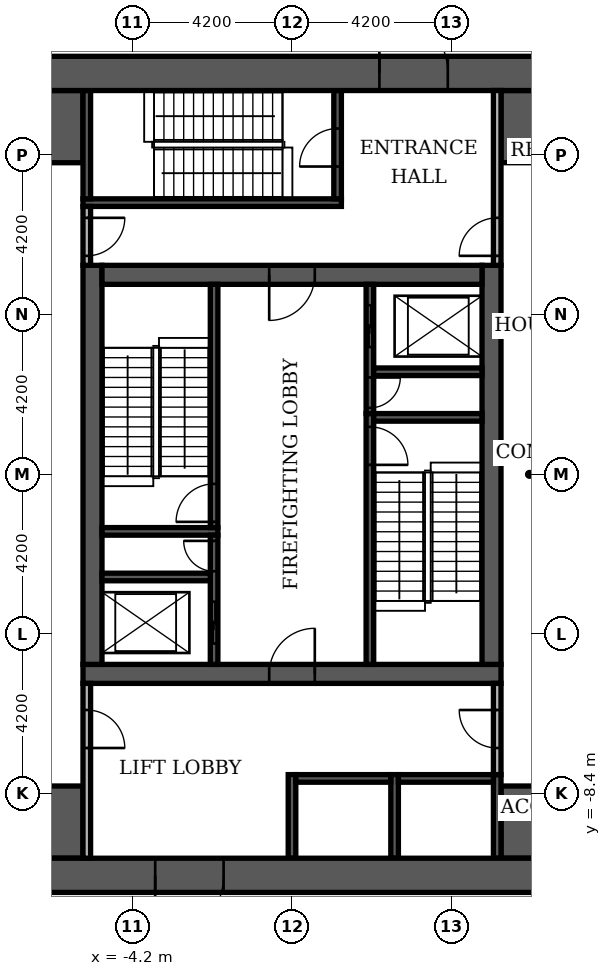
"""IFC4 building model, lengths in metres.
Left out: names, types, materials, properties, quantities, classifications, styles, units other than length and angle.
Written with IfcOpenShell. Run it as: python <this file> out.ifc"""

import sys

from ifc_helpers import new_model, si_unit, direction, frame, frame_2d, origin, place, context, subcontext, project, spatial, rectangle, extrude, element, fill, save


model = new_model("IFC4")
c1 = context("Model", 3, precision=1e-05, world=origin(), true_north=direction((0.0, 1.0)))
c2 = subcontext(c1, "Body", "Model", "MODEL_VIEW")
j1 = project(units=[si_unit("LENGTHUNIT", "METRE"), si_unit("PLANEANGLEUNIT", "RADIAN")], contexts=[c1])
p1 = place(None, origin())
s1 = spatial("IfcSite", under=j1, at=p1, CompositionType="ELEMENT")
p2 = place(p1, origin())
s2 = spatial("IfcBuilding", under=s1, at=p2, CompositionType="ELEMENT")
p3 = place(p2, frame((0.0, 0.0, 22.2)))
s3 = spatial("IfcBuildingStorey", under=s2, at=p3, CompositionType="ELEMENT", Elevation=22.2)
p4 = place(p3, frame((-5.5, -5.25, 0.0), z_axis=(0.0, 0.0, 1.0), x_axis=(1.0, 0.0, 0.0)))
e1 = element("IfcWall", 1, at=p4, inside=s3, PredefinedType="SHEAR", context=c2, shape_type="SweptSolid", body=[
    extrude(rectangle(XDim=11.0, YDim=0.5, at=frame_2d((5.5, 0.0))), origin(), (0.0, 0.0, 1.0), 4.3),
])
p5 = place(p4, frame((4.9, 0.0, 0.0)))
e2 = element("IfcOpeningElement", 2, at=p5, cuts=e1, PredefinedType="OPENING", context=c2, shape_type="SweptSolid", body=[
    extrude(rectangle(XDim=1.2, YDim=2.1, at=frame_2d((0.6, 1.05))), frame((0.0, 0.26, 0.0), z_axis=(0.0, -1.0, 0.0), x_axis=(1.0, 0.0, 0.0)), (0.0, 0.0, 1.0), 0.52),
])
for number, where, z_axis, x_axis in (
    (3, (-5.25, -5.0, 0.0), (0.0, 0.0, 1.0), (0.0, 1.0, 0.0)),
    (4, (5.25, -5.0, 0.0), (0.0, 0.0, 1.0), (0.0, 1.0, 0.0)),
):
    element("IfcWall", number, at=place(p3, frame(where, z_axis=z_axis, x_axis=x_axis)), inside=s3, PredefinedType="SHEAR", context=c2, shape_type="SweptSolid", body=[
        extrude(rectangle(XDim=10.5, YDim=0.5, at=frame_2d((5.25, 0.0))), origin(), (0.0, 0.0, 1.0), 4.3),
    ])
p6 = place(p3, frame((-5.0, 5.25, 0.0), z_axis=(0.0, 0.0, 1.0), x_axis=(1.0, 0.0, 0.0)))
e5 = element("IfcWall", 5, at=p6, inside=s3, PredefinedType="SHEAR", context=c2, shape_type="SweptSolid", body=[
    extrude(rectangle(XDim=10.0, YDim=0.5, at=frame_2d((5.0, 0.0))), origin(), (0.0, 0.0, 1.0), 4.3),
])
p7 = place(p6, frame((4.4, 0.0, 0.0)))
e6 = element("IfcOpeningElement", 6, at=p7, cuts=e5, PredefinedType="OPENING", context=c2, shape_type="SweptSolid", body=[
    extrude(rectangle(XDim=1.2, YDim=2.1, at=frame_2d((0.6, 1.05))), frame((0.0, 0.26, 0.0), z_axis=(0.0, -1.0, 0.0), x_axis=(1.0, 0.0, 0.0)), (0.0, 0.0, 1.0), 0.52),
])
for number, where, z_axis, x_axis in (
    (7, (-10.1, -9.15, 0.0), (0.0, 0.0, 1.0), (1.0, 0.0, 0.0)),
    (8, (5.5, -9.15, 0.0), (0.0, 0.0, 1.0), (1.0, 0.0, 0.0)),
    (9, (-10.1, 9.15, 0.0), (0.0, 0.0, 1.0), (1.0, 0.0, 0.0)),
    (10, (5.5, 9.15, 0.0), (0.0, 0.0, 1.0), (1.0, 0.0, 0.0)),
):
    element("IfcWall", number, at=place(p3, frame(where, z_axis=z_axis, x_axis=x_axis)), inside=s3, PredefinedType="SHEAR", context=c2, shape_type="SweptSolid", body=[
        extrude(rectangle(XDim=4.6, YDim=1.9, at=frame_2d((2.3, 0.0))), origin(), (0.0, 0.0, 1.0), 4.3),
    ])
p8 = place(p3, frame((2.05, -5.0, 0.0), z_axis=(0.0, 0.0, 1.0), x_axis=(0.0, 1.0, 0.0)))
e11 = element("IfcWall", 11, at=p8, inside=s3, PredefinedType="SHEAR", context=c2, shape_type="SweptSolid", body=[
    extrude(rectangle(XDim=6.6, YDim=0.2, at=frame_2d((3.3, 0.0))), origin(), (0.0, 0.0, 1.0), 4.3),
])
p9 = place(p8, frame((5.25, 0.0, 0.0)))
e12 = element("IfcOpeningElement", 12, at=p9, cuts=e11, PredefinedType="OPENING", context=c2, shape_type="SweptSolid", body=[
    extrude(rectangle(XDim=1.0, YDim=2.1, at=frame_2d((0.5, 1.05))), frame((0.0, 0.11, 0.0), z_axis=(0.0, -1.0, 0.0), x_axis=(1.0, 0.0, 0.0)), (0.0, 0.0, 1.0), 0.22),
])
p10 = place(p3, frame((-5.0, -1.5, 0.0), z_axis=(0.0, 0.0, 1.0), x_axis=(1.0, 0.0, 0.0)))
e13 = element("IfcWall", 13, at=p10, inside=s3, PredefinedType="SHEAR", context=c2, shape_type="SweptSolid", body=[
    extrude(rectangle(XDim=3.05, YDim=0.2, at=frame_2d((1.525, 0.0))), origin(), (0.0, 0.0, 1.0), 4.3),
])
p11 = place(p3, frame((-2.05, -1.4, 0.0), z_axis=(0.0, 0.0, 1.0), x_axis=(0.0, 1.0, 0.0)))
e14 = element("IfcWall", 14, at=p11, inside=s3, PredefinedType="SHEAR", context=c2, shape_type="SweptSolid", body=[
    extrude(rectangle(XDim=6.4, YDim=0.2, at=frame_2d((3.2, 0.0))), origin(), (0.0, 0.0, 1.0), 4.3),
])
p12 = place(p11, frame((0.15, 0.0, 0.0)))
e15 = element("IfcOpeningElement", 15, at=p12, cuts=e14, PredefinedType="OPENING", context=c2, shape_type="SweptSolid", body=[
    extrude(rectangle(XDim=1.0, YDim=2.1, at=frame_2d((0.5, 1.05))), frame((0.0, 0.11, 0.0), z_axis=(0.0, -1.0, 0.0), x_axis=(1.0, 0.0, 0.0)), (0.0, 0.0, 1.0), 0.22),
])
p13 = place(p3, frame((2.15, 1.5, 0.0), z_axis=(0.0, 0.0, 1.0), x_axis=(1.0, 0.0, 0.0)))
e16 = element("IfcWall", 16, at=p13, inside=s3, PredefinedType="SHEAR", context=c2, shape_type="SweptSolid", body=[
    extrude(rectangle(XDim=2.85, YDim=0.2, at=frame_2d((1.425, 0.0))), origin(), (0.0, 0.0, 1.0), 4.3),
])
p14 = place(p3, frame((-5.5, 7.15, 0.0), z_axis=(0.0, 0.0, 1.0), x_axis=(1.0, 0.0, 0.0)))
e17 = element("IfcWall", 17, at=p14, inside=s3, PredefinedType="SHEAR", context=c2, shape_type="SweptSolid", body=[
    extrude(rectangle(XDim=6.8, YDim=0.2, at=frame_2d((3.4, 0.0))), origin(), (0.0, 0.0, 1.0), 4.3),
])
p15 = place(p3, frame((-5.4, 7.25, 0.0), z_axis=(0.0, 0.0, 1.0), x_axis=(0.0, 1.0, 0.0)))
e18 = element("IfcWall", 18, at=p15, inside=s3, PredefinedType="SHEAR", context=c2, shape_type="SweptSolid", body=[
    extrude(rectangle(XDim=2.85, YDim=0.2, at=frame_2d((1.425, 0.0))), origin(), (0.0, 0.0, 1.0), 4.3),
])
p16 = place(p3, frame((1.2, 7.25, 0.0), z_axis=(0.0, 0.0, 1.0), x_axis=(0.0, 1.0, 0.0)))
e19 = element("IfcWall", 19, at=p16, inside=s3, PredefinedType="SHEAR", context=c2, shape_type="SweptSolid", body=[
    extrude(rectangle(XDim=2.85, YDim=0.2, at=frame_2d((1.425, 0.0))), origin(), (0.0, 0.0, 1.0), 4.3),
])
p17 = place(p16, frame((0.85, 0.0, 0.0)))
e20 = element("IfcOpeningElement", 20, at=p17, cuts=e19, PredefinedType="OPENING", context=c2, shape_type="SweptSolid", body=[
    extrude(rectangle(XDim=1.0, YDim=2.1, at=frame_2d((0.5, 1.05))), frame((0.0, 0.11, 0.0), z_axis=(0.0, -1.0, 0.0), x_axis=(1.0, 0.0, 0.0)), (0.0, 0.0, 1.0), 0.22),
])
for number, where, z_axis, x_axis in (
    (21, (0.0, -10.1, 0.0), (0.0, 0.0, 1.0), (0.0, 1.0, 0.0)),
    (22, (2.7, -10.1, 0.0), (0.0, 0.0, 1.0), (0.0, 1.0, 0.0)),
    (23, (5.4, -10.1, 0.0), (0.0, 0.0, 1.0), (0.0, 1.0, 0.0)),
):
    element("IfcWall", number, at=place(p3, frame(where, z_axis=z_axis, x_axis=x_axis)), inside=s3, PredefinedType="SHEAR", context=c2, shape_type="SweptSolid", body=[
        extrude(rectangle(XDim=2.2, YDim=0.2, at=frame_2d((1.1, 0.0))), origin(), (0.0, 0.0, 1.0), 4.3),
    ])
for number, where, z_axis, x_axis in (
    (24, (0.1, -8.0, 0.0), (0.0, 0.0, 1.0), (1.0, 0.0, 0.0)),
    (25, (2.8, -8.0, 0.0), (0.0, 0.0, 1.0), (1.0, 0.0, 0.0)),
):
    element("IfcWall", number, at=place(p3, frame(where, z_axis=z_axis, x_axis=x_axis)), inside=s3, PredefinedType="SHEAR", context=c2, shape_type="SweptSolid", body=[
        extrude(rectangle(XDim=2.5, YDim=0.2, at=frame_2d((1.25, 0.0))), origin(), (0.0, 0.0, 1.0), 4.3),
    ])
p18 = place(p3, frame((-2.05, -5.0, 0.0), z_axis=(0.0, 0.0, 1.0), x_axis=(0.0, 1.0, 0.0)))
e26 = element("IfcWall", 26, at=p18, inside=s3, PredefinedType="SHEAR", context=c2, shape_type="SweptSolid", body=[
    extrude(rectangle(XDim=3.4, YDim=0.2, at=frame_2d((1.7, 0.0))), origin(), (0.0, 0.0, 1.0), 4.3),
])
p19 = place(p18, frame((0.55, 0.0, 0.0)))
e27 = element("IfcOpeningElement", 27, at=p19, cuts=e26, PredefinedType="OPENING", context=c2, shape_type="SweptSolid", body=[
    extrude(rectangle(XDim=1.1, YDim=2.1, at=frame_2d((0.55, 1.05))), frame((0.0, 0.11, 0.0), z_axis=(0.0, -1.0, 0.0), x_axis=(1.0, 0.0, 0.0)), (0.0, 0.0, 1.0), 0.22),
])
p20 = place(p18, frame((2.45, 0.0, 0.0)))
e28 = element("IfcOpeningElement", 28, at=p20, cuts=e26, PredefinedType="OPENING", context=c2, shape_type="SweptSolid", body=[
    extrude(rectangle(XDim=0.8, YDim=2.1, at=frame_2d((0.4, 1.05))), frame((0.0, 0.11, 0.0), z_axis=(0.0, -1.0, 0.0), x_axis=(1.0, 0.0, 0.0)), (0.0, 0.0, 1.0), 0.22),
])
p21 = place(p3, frame((-5.0, -2.7, 0.0), z_axis=(0.0, 0.0, 1.0), x_axis=(1.0, 0.0, 0.0)))
e29 = element("IfcWall", 29, at=p21, inside=s3, PredefinedType="SHEAR", context=c2, shape_type="SweptSolid", body=[
    extrude(rectangle(XDim=2.85, YDim=0.2, at=frame_2d((1.425, 0.0))), origin(), (0.0, 0.0, 1.0), 4.3),
])
p22 = place(p3, frame((2.05, 1.6, 0.0), z_axis=(0.0, 0.0, 1.0), x_axis=(0.0, 1.0, 0.0)))
e30 = element("IfcWall", 30, at=p22, inside=s3, PredefinedType="SHEAR", context=c2, shape_type="SweptSolid", body=[
    extrude(rectangle(XDim=3.4, YDim=0.2, at=frame_2d((1.7, 0.0))), origin(), (0.0, 0.0, 1.0), 4.3),
])
p23 = place(p22, frame((1.75, 0.0, 0.0)))
e31 = element("IfcOpeningElement", 31, at=p23, cuts=e30, PredefinedType="OPENING", context=c2, shape_type="SweptSolid", body=[
    extrude(rectangle(XDim=1.1, YDim=2.1, at=frame_2d((0.55, 1.05))), frame((0.0, 0.11, 0.0), z_axis=(0.0, -1.0, 0.0), x_axis=(1.0, 0.0, 0.0)), (0.0, 0.0, 1.0), 0.22),
])
p24 = place(p22, frame((0.15, 0.0, 0.0)))
e32 = element("IfcOpeningElement", 32, at=p24, cuts=e30, PredefinedType="OPENING", context=c2, shape_type="SweptSolid", body=[
    extrude(rectangle(XDim=0.8, YDim=2.1, at=frame_2d((0.4, 1.05))), frame((0.0, 0.11, 0.0), z_axis=(0.0, -1.0, 0.0), x_axis=(1.0, 0.0, 0.0)), (0.0, 0.0, 1.0), 0.22),
])
p25 = place(p3, frame((2.15, 2.7, 0.0), z_axis=(0.0, 0.0, 1.0), x_axis=(1.0, 0.0, 0.0)))
e33 = element("IfcWall", 33, at=p25, inside=s3, PredefinedType="SHEAR", context=c2, shape_type="SweptSolid", body=[
    extrude(rectangle(XDim=2.85, YDim=0.2, at=frame_2d((1.425, 0.0))), origin(), (0.0, 0.0, 1.0), 4.3),
])
p26 = place(p3, frame((-11.0, -10.55, 0.0), z_axis=(0.0, 0.0, 1.0), x_axis=(1.0, 0.0, 0.0)))
e34 = element("IfcWall", 34, at=p26, inside=s3, PredefinedType="SHEAR", context=c2, shape_type="SweptSolid", body=[
    extrude(rectangle(XDim=22.0, YDim=0.9, at=frame_2d((11.0, 0.0))), origin(), (0.0, 0.0, 1.0), 4.3),
])
p27 = place(p26, frame((7.4, 0.0, 0.0)))
e35 = element("IfcOpeningElement", 35, at=p27, cuts=e34, PredefinedType="OPENING", context=c2, shape_type="SweptSolid", body=[
    extrude(rectangle(XDim=1.8, YDim=2.2, at=frame_2d((0.9, 1.1))), frame((0.0, 0.46, 0.0), z_axis=(0.0, -1.0, 0.0), x_axis=(1.0, 0.0, 0.0)), (0.0, 0.0, 1.0), 0.92),
])
p28 = place(p3, frame((-11.0, 10.55, 0.0), z_axis=(0.0, 0.0, 1.0), x_axis=(1.0, 0.0, 0.0)))
e36 = element("IfcWall", 36, at=p28, inside=s3, PredefinedType="SHEAR", context=c2, shape_type="SweptSolid", body=[
    extrude(rectangle(XDim=22.0, YDim=0.9, at=frame_2d((11.0, 0.0))), origin(), (0.0, 0.0, 1.0), 4.3),
])
p29 = place(p28, frame((13.3, 0.0, 0.0)))
e37 = element("IfcOpeningElement", 37, at=p29, cuts=e36, PredefinedType="OPENING", context=c2, shape_type="SweptSolid", body=[
    extrude(rectangle(XDim=1.8, YDim=2.2, at=frame_2d((0.9, 1.1))), frame((0.0, 0.46, 0.0), z_axis=(0.0, -1.0, 0.0), x_axis=(1.0, 0.0, 0.0)), (0.0, 0.0, 1.0), 0.92),
])
p30 = place(p3, frame((-5.4, -10.1, 0.0), z_axis=(0.0, 0.0, 1.0), x_axis=(0.0, 1.0, 0.0)))
e38 = element("IfcWall", 38, at=p30, inside=s3, PredefinedType="PARTITIONING", context=c2, shape_type="SweptSolid", body=[
    extrude(rectangle(XDim=4.6, YDim=0.2, at=frame_2d((2.3, 0.0))), origin(), (0.0, 0.0, 1.0), 4.3),
])
p31 = place(p30, frame((2.9, 0.0, 0.0)))
e39 = element("IfcOpeningElement", 39, at=p31, cuts=e38, PredefinedType="OPENING", context=c2, shape_type="SweptSolid", body=[
    extrude(rectangle(XDim=1.0, YDim=2.1, at=frame_2d((0.5, 1.05))), frame((0.0, 0.11, 0.0), z_axis=(0.0, -1.0, 0.0), x_axis=(1.0, 0.0, 0.0)), (0.0, 0.0, 1.0), 0.22),
])
p32 = place(p3, frame((5.4, -7.9, 0.0), z_axis=(0.0, 0.0, 1.0), x_axis=(0.0, 1.0, 0.0)))
e40 = element("IfcWall", 40, at=p32, inside=s3, PredefinedType="PARTITIONING", context=c2, shape_type="SweptSolid", body=[
    extrude(rectangle(XDim=2.4, YDim=0.2, at=frame_2d((1.2, 0.0))), origin(), (0.0, 0.0, 1.0), 4.3),
])
p33 = place(p32, frame((0.7, 0.0, 0.0)))
e41 = element("IfcOpeningElement", 41, at=p33, cuts=e40, PredefinedType="OPENING", context=c2, shape_type="SweptSolid", body=[
    extrude(rectangle(XDim=1.0, YDim=2.1, at=frame_2d((0.5, 1.05))), frame((0.0, 0.11, 0.0), z_axis=(0.0, -1.0, 0.0), x_axis=(1.0, 0.0, 0.0)), (0.0, 0.0, 1.0), 0.22),
])
p34 = place(p3, frame((-5.4, 5.5, 0.0), z_axis=(0.0, 0.0, 1.0), x_axis=(0.0, 1.0, 0.0)))
e42 = element("IfcWall", 42, at=p34, inside=s3, PredefinedType="PARTITIONING", context=c2, shape_type="SweptSolid", body=[
    extrude(rectangle(XDim=1.55, YDim=0.2, at=frame_2d((0.775, 0.0))), origin(), (0.0, 0.0, 1.0), 4.3),
])
p35 = place(p34, frame((0.25, 0.0, 0.0)))
e43 = element("IfcOpeningElement", 43, at=p35, cuts=e42, PredefinedType="OPENING", context=c2, shape_type="SweptSolid", body=[
    extrude(rectangle(XDim=1.0, YDim=2.1, at=frame_2d((0.5, 1.05))), frame((0.0, 0.11, 0.0), z_axis=(0.0, -1.0, 0.0), x_axis=(1.0, 0.0, 0.0)), (0.0, 0.0, 1.0), 0.22),
])
p36 = place(p3, frame((5.4, 5.5, 0.0), z_axis=(0.0, 0.0, 1.0), x_axis=(0.0, 1.0, 0.0)))
e44 = element("IfcWall", 44, at=p36, inside=s3, PredefinedType="PARTITIONING", context=c2, shape_type="SweptSolid", body=[
    extrude(rectangle(XDim=4.6, YDim=0.2, at=frame_2d((2.3, 0.0))), origin(), (0.0, 0.0, 1.0), 4.3),
])
p37 = place(p36, frame((0.25, 0.0, 0.0)))
e45 = element("IfcOpeningElement", 45, at=p37, cuts=e44, PredefinedType="OPENING", context=c2, shape_type="SweptSolid", body=[
    extrude(rectangle(XDim=1.0, YDim=2.1, at=frame_2d((0.5, 1.05))), frame((0.0, 0.11, 0.0), z_axis=(0.0, -1.0, 0.0), x_axis=(1.0, 0.0, 0.0)), (0.0, 0.0, 1.0), 0.22),
])
p38 = place(p23, origin())
e46 = element("IfcDoor", 46, at=p38, inside=s3, OperationType="SLIDING_TO_LEFT", PredefinedType="DOOR", context=c2, shape_type="SweptSolid", body=[
    extrude(rectangle(XDim=1.1, YDim=2.1, at=frame_2d((0.55, 1.05))), frame((0.0, 0.025, 0.0), z_axis=(0.0, -1.0, 0.0), x_axis=(1.0, 0.0, 0.0)), (0.0, 0.0, 1.0), 0.05),
])
fill(e31, e46)
p39 = place(p19, origin())
e47 = element("IfcDoor", 47, at=p39, inside=s3, OperationType="SLIDING_TO_LEFT", PredefinedType="DOOR", context=c2, shape_type="SweptSolid", body=[
    extrude(rectangle(XDim=1.1, YDim=2.1, at=frame_2d((0.55, 1.05))), frame((0.0, 0.025, 0.0), z_axis=(0.0, -1.0, 0.0), x_axis=(1.0, 0.0, 0.0)), (0.0, 0.0, 1.0), 0.05),
])
fill(e27, e47)
p40 = place(p12, origin())
e48 = element("IfcDoor", 48, at=p40, inside=s3, OperationType="SINGLE_SWING_LEFT", PredefinedType="DOOR", context=c2, shape_type="SweptSolid", body=[
    extrude(rectangle(XDim=1.0, YDim=2.1, at=frame_2d((0.5, 1.05))), frame((0.0, 0.025, 0.0), z_axis=(0.0, -1.0, 0.0), x_axis=(1.0, 0.0, 0.0)), (0.0, 0.0, 1.0), 0.05),
])
fill(e15, e48)
p41 = place(p9, frame((1.0, 0.0, 0.0), z_axis=(0.0, 0.0, 1.0), x_axis=(-1.0, 0.0, 0.0)))
e49 = element("IfcDoor", 49, at=p41, inside=s3, OperationType="SINGLE_SWING_LEFT", PredefinedType="DOOR", context=c2, shape_type="SweptSolid", body=[
    extrude(rectangle(XDim=1.0, YDim=2.1, at=frame_2d((0.5, 1.05))), frame((0.0, 0.025, 0.0), z_axis=(0.0, -1.0, 0.0), x_axis=(1.0, 0.0, 0.0)), (0.0, 0.0, 1.0), 0.05),
])
fill(e12, e49)
p42 = place(p24, frame((0.8, 0.0, 0.0), z_axis=(0.0, 0.0, 1.0), x_axis=(-1.0, 0.0, 0.0)))
e50 = element("IfcDoor", 50, at=p42, inside=s3, OperationType="SINGLE_SWING_RIGHT", PredefinedType="DOOR", context=c2, shape_type="SweptSolid", body=[
    extrude(rectangle(XDim=0.8, YDim=2.1, at=frame_2d((0.4, 1.05))), frame((0.0, 0.025, 0.0), z_axis=(0.0, -1.0, 0.0), x_axis=(1.0, 0.0, 0.0)), (0.0, 0.0, 1.0), 0.05),
])
fill(e32, e50)
p43 = place(p20, origin())
e51 = element("IfcDoor", 51, at=p43, inside=s3, OperationType="SINGLE_SWING_RIGHT", PredefinedType="DOOR", context=c2, shape_type="SweptSolid", body=[
    extrude(rectangle(XDim=0.8, YDim=2.1, at=frame_2d((0.4, 1.05))), frame((0.0, 0.025, 0.0), z_axis=(0.0, -1.0, 0.0), x_axis=(1.0, 0.0, 0.0)), (0.0, 0.0, 1.0), 0.05),
])
fill(e28, e51)
p44 = place(p7, frame((1.2, 0.0, 0.0), z_axis=(0.0, 0.0, 1.0), x_axis=(-1.0, 0.0, 0.0)))
e52 = element("IfcDoor", 52, at=p44, inside=s3, OperationType="SINGLE_SWING_LEFT", PredefinedType="DOOR", context=c2, shape_type="SweptSolid", body=[
    extrude(rectangle(XDim=1.2, YDim=2.1, at=frame_2d((0.6, 1.05))), frame((0.0, 0.025, 0.0), z_axis=(0.0, -1.0, 0.0), x_axis=(1.0, 0.0, 0.0)), (0.0, 0.0, 1.0), 0.05),
])
fill(e6, e52)
p45 = place(p5, origin())
e53 = element("IfcDoor", 53, at=p45, inside=s3, OperationType="SINGLE_SWING_RIGHT", PredefinedType="DOOR", context=c2, shape_type="SweptSolid", body=[
    extrude(rectangle(XDim=1.2, YDim=2.1, at=frame_2d((0.6, 1.05))), frame((0.0, 0.025, 0.0), z_axis=(0.0, -1.0, 0.0), x_axis=(1.0, 0.0, 0.0)), (0.0, 0.0, 1.0), 0.05),
])
fill(e2, e53)
p46 = place(p17, origin())
e54 = element("IfcDoor", 54, at=p46, inside=s3, OperationType="SINGLE_SWING_LEFT", PredefinedType="DOOR", context=c2, shape_type="SweptSolid", body=[
    extrude(rectangle(XDim=1.0, YDim=2.1, at=frame_2d((0.5, 1.05))), frame((0.0, 0.025, 0.0), z_axis=(0.0, -1.0, 0.0), x_axis=(1.0, 0.0, 0.0)), (0.0, 0.0, 1.0), 0.05),
])
fill(e20, e54)
p47 = place(p35, frame((1.0, 0.0, 0.0), z_axis=(0.0, 0.0, 1.0), x_axis=(-1.0, 0.0, 0.0)))
e55 = element("IfcDoor", 55, at=p47, inside=s3, OperationType="SINGLE_SWING_RIGHT", PredefinedType="DOOR", context=c2, shape_type="SweptSolid", body=[
    extrude(rectangle(XDim=1.0, YDim=2.1, at=frame_2d((0.5, 1.05))), frame((0.0, 0.025, 0.0), z_axis=(0.0, -1.0, 0.0), x_axis=(1.0, 0.0, 0.0)), (0.0, 0.0, 1.0), 0.05),
])
fill(e43, e55)
p48 = place(p37, origin())
e56 = element("IfcDoor", 56, at=p48, inside=s3, OperationType="SINGLE_SWING_LEFT", PredefinedType="DOOR", context=c2, shape_type="SweptSolid", body=[
    extrude(rectangle(XDim=1.0, YDim=2.1, at=frame_2d((0.5, 1.05))), frame((0.0, 0.025, 0.0), z_axis=(0.0, -1.0, 0.0), x_axis=(1.0, 0.0, 0.0)), (0.0, 0.0, 1.0), 0.05),
])
fill(e45, e56)
p49 = place(p31, frame((1.0, 0.0, 0.0), z_axis=(0.0, 0.0, 1.0), x_axis=(-1.0, 0.0, 0.0)))
e57 = element("IfcDoor", 57, at=p49, inside=s3, OperationType="SINGLE_SWING_LEFT", PredefinedType="DOOR", context=c2, shape_type="SweptSolid", body=[
    extrude(rectangle(XDim=1.0, YDim=2.1, at=frame_2d((0.5, 1.05))), frame((0.0, 0.025, 0.0), z_axis=(0.0, -1.0, 0.0), x_axis=(1.0, 0.0, 0.0)), (0.0, 0.0, 1.0), 0.05),
])
fill(e39, e57)
p50 = place(p33, origin())
e58 = element("IfcDoor", 58, at=p50, inside=s3, OperationType="SINGLE_SWING_RIGHT", PredefinedType="DOOR", context=c2, shape_type="SweptSolid", body=[
    extrude(rectangle(XDim=1.0, YDim=2.1, at=frame_2d((0.5, 1.05))), frame((0.0, 0.025, 0.0), z_axis=(0.0, -1.0, 0.0), x_axis=(1.0, 0.0, 0.0)), (0.0, 0.0, 1.0), 0.05),
])
fill(e41, e58)
p51 = place(p29, origin())
e59 = element("IfcDoor", 59, at=p51, inside=s3, OperationType="DOUBLE_DOOR_SINGLE_SWING", PredefinedType="DOOR", context=c2, shape_type="SweptSolid", body=[
    extrude(rectangle(XDim=1.8, YDim=2.2, at=frame_2d((0.9, 1.1))), frame((0.0, 0.025, 0.0), z_axis=(0.0, -1.0, 0.0), x_axis=(1.0, 0.0, 0.0)), (0.0, 0.0, 1.0), 0.05),
])
fill(e37, e59)
p52 = place(p27, frame((1.8, 0.0, 0.0), z_axis=(0.0, 0.0, 1.0), x_axis=(-1.0, 0.0, 0.0)))
e60 = element("IfcDoor", 60, at=p52, inside=s3, OperationType="DOUBLE_DOOR_SINGLE_SWING", PredefinedType="DOOR", context=c2, shape_type="SweptSolid", body=[
    extrude(rectangle(XDim=1.8, YDim=2.2, at=frame_2d((0.9, 1.1))), frame((0.0, 0.025, 0.0), z_axis=(0.0, -1.0, 0.0), x_axis=(1.0, 0.0, 0.0)), (0.0, 0.0, 1.0), 0.05),
])
fill(e35, e60)
save(model, sys.argv[1])
